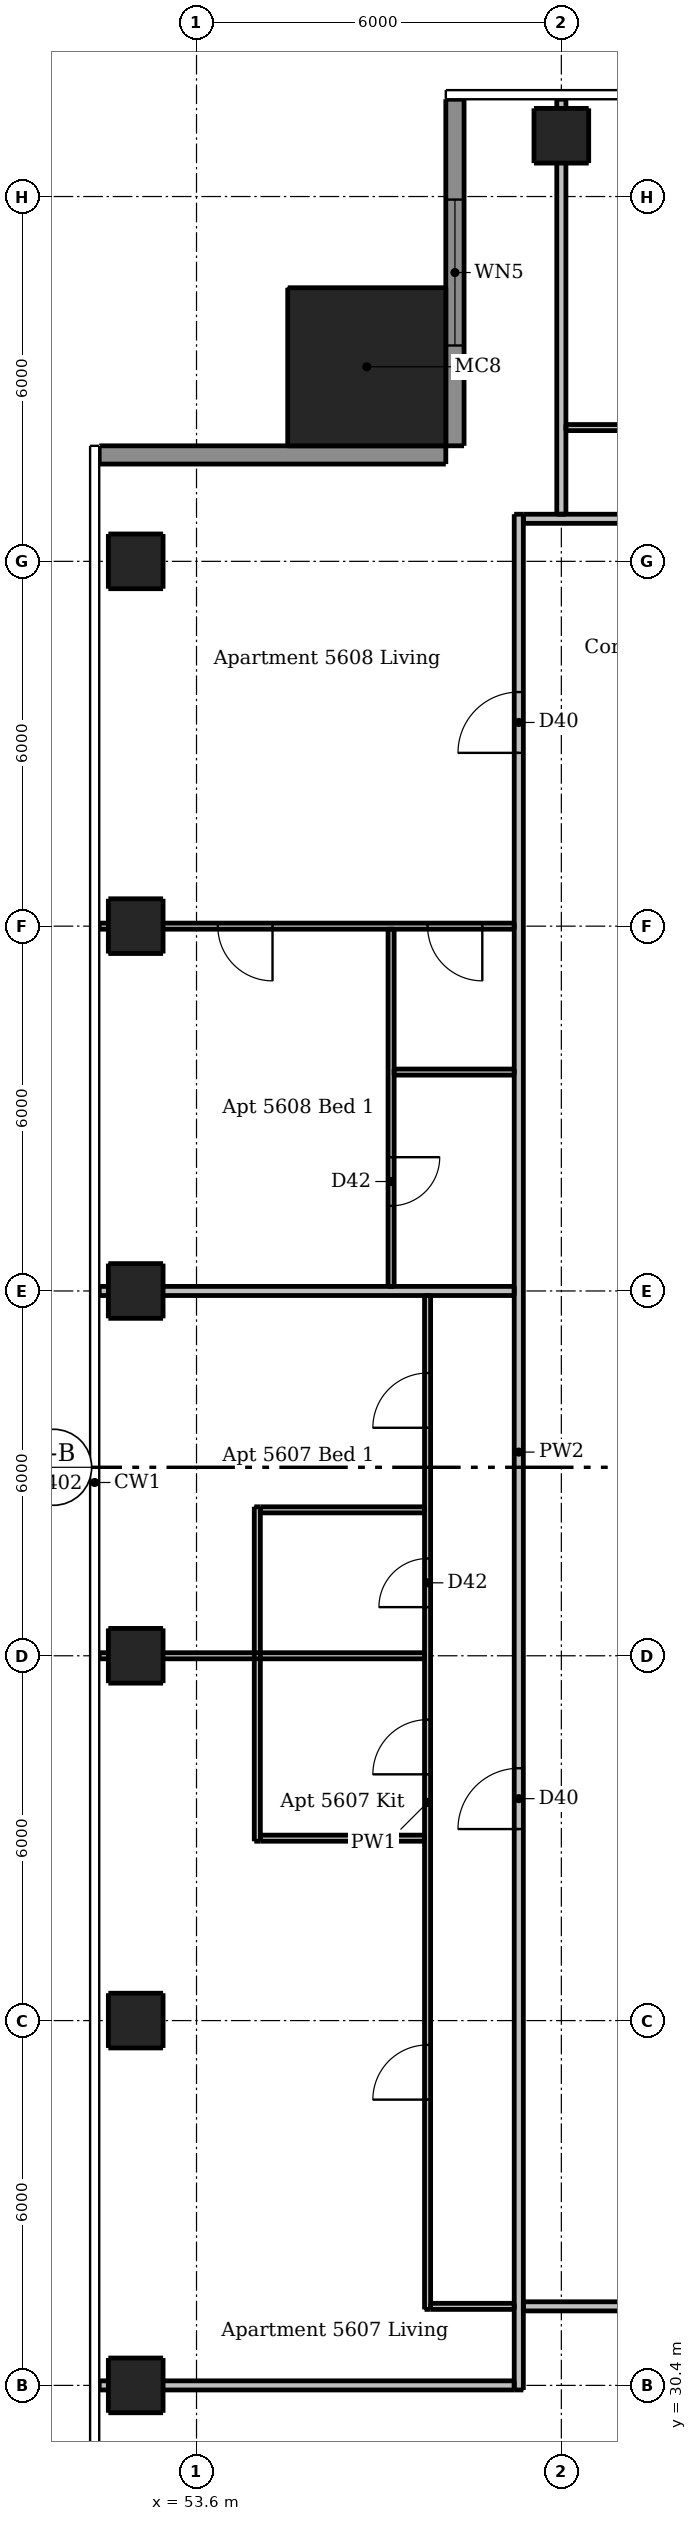
"""IFC4 building model, lengths in metres.
Left out: names, types, materials, properties, quantities, classifications, styles, units other than length and angle.
Written with IfcOpenShell. Run it as: python <this file> out.ifc"""

import sys

from ifc_helpers import new_model, si_unit, direction, frame, frame_2d, origin, origin_2d, place, context, subcontext, project, spatial, rectangle, extrude, element, fill, save


model = new_model("IFC4")
c1 = context("Model", 3, precision=1e-05, world=origin(), true_north=direction((0.0, 1.0)))
c2 = subcontext(c1, "Body", "Model", "MODEL_VIEW")
j1 = project(units=[si_unit("LENGTHUNIT", "METRE"), si_unit("PLANEANGLEUNIT", "RADIAN")], contexts=[c1])
p1 = place(None, origin())
s1 = spatial("IfcSite", under=j1, at=p1, CompositionType="ELEMENT")
p2 = place(p1, origin())
s2 = spatial("IfcBuilding", under=s1, at=p2, CompositionType="ELEMENT")
p3 = place(p2, frame((0.0, 0.0, 210.1)))
s3 = spatial("IfcBuildingStorey", under=s2, at=p3, CompositionType="ELEMENT", Elevation=210.1)
for number, where, z_axis, x_axis in (
    (1, (59.6, 67.4, 0.0), (0.0, 0.0, 1.0), (1.0, 0.0, 0.0)),
    (2, (52.6, 30.4, 0.0), (0.0, 0.0, 1.0), (1.0, 0.0, 0.0)),
    (3, (52.6, 36.4, 0.0), (0.0, 0.0, 1.0), (1.0, 0.0, 0.0)),
    (4, (52.6, 42.4, 0.0), (0.0, 0.0, 1.0), (1.0, 0.0, 0.0)),
    (5, (52.6, 48.4, 0.0), (0.0, 0.0, 1.0), (1.0, 0.0, 0.0)),
    (6, (52.6, 54.4, 0.0), (0.0, 0.0, 1.0), (1.0, 0.0, 0.0)),
    (7, (52.6, 60.4, 0.0), (0.0, 0.0, 1.0), (1.0, 0.0, 0.0)),
):
    element("IfcColumn", number, at=place(p3, frame(where, z_axis=z_axis, x_axis=x_axis)), inside=s3, PredefinedType="COLUMN", context=c2, shape_type="SweptSolid", body=[
        extrude(rectangle(XDim=0.9, YDim=0.9, at=origin_2d()), origin(), (0.0, 0.0, 1.0), 3.05),
    ])
p4 = place(p3, frame((56.4, 63.6, 0.0), z_axis=(0.0, 0.0, 1.0), x_axis=(1.0, 0.0, 0.0)))
e8 = element("IfcColumn", 8, at=p4, inside=s3, PredefinedType="COLUMN", context=c2, shape_type="SweptSolid", body=[
    extrude(rectangle(XDim=2.6, YDim=2.6, at=origin_2d()), origin(), (0.0, 0.0, 1.0), 3.3),
])
p5 = place(p3, frame((57.85, 68.0, 0.0), z_axis=(0.0, 0.0, 1.0), x_axis=(0.0, -1.0, 0.0)))
e9 = element("IfcWall", 9, at=p5, inside=s3, PredefinedType="SOLIDWALL", context=c2, shape_type="SweptSolid", body=[
    extrude(rectangle(XDim=5.7, YDim=0.3, at=frame_2d((2.85, 0.0))), origin(), (0.0, 0.0, 1.0), 3.05),
])
p6 = place(p5, frame((1.65, 0.0, 0.15)))
e10 = element("IfcOpeningElement", 10, at=p6, cuts=e9, PredefinedType="OPENING", context=c2, shape_type="SweptSolid", body=[
    extrude(rectangle(XDim=2.4, YDim=2.1, at=frame_2d((1.2, 1.05))), frame((0.0, 0.16, 0.0), z_axis=(0.0, -1.0, 0.0), x_axis=(1.0, 0.0, 0.0)), (0.0, 0.0, 1.0), 0.32),
])
p7 = place(p3, frame((57.7, 62.15, 0.0), z_axis=(0.0, 0.0, 1.0), x_axis=(-1.0, 0.0, 0.0)))
e11 = element("IfcWall", 11, at=p7, inside=s3, PredefinedType="SOLIDWALL", context=c2, shape_type="SweptSolid", body=[
    extrude(rectangle(XDim=5.7, YDim=0.3, at=frame_2d((2.85, 0.0))), origin(), (0.0, 0.0, 1.0), 3.05),
])
p8 = place(p3, frame((54.6, 39.35, 0.0), z_axis=(0.0, 0.0, 1.0), x_axis=(0.0, 1.0, 0.0)))
e12 = element("IfcWall", 12, at=p8, inside=s3, PredefinedType="PARTITIONING", context=c2, shape_type="SweptSolid", body=[
    extrude(rectangle(XDim=5.5, YDim=0.1, at=frame_2d((2.75, 0.0))), origin(), (0.0, 0.0, 1.0), 3.05),
])
p9 = place(p3, frame((56.8, 54.35, 0.0), z_axis=(0.0, 0.0, 1.0), x_axis=(0.0, -1.0, 0.0)))
e13 = element("IfcWall", 13, at=p9, inside=s3, PredefinedType="PARTITIONING", context=c2, shape_type="SweptSolid", body=[
    extrude(rectangle(XDim=5.875, YDim=0.1, at=frame_2d((2.938, 0.0))), origin(), (0.0, 0.0, 1.0), 3.05),
])
p10 = place(p9, frame((3.75, 0.0, 0.0)))
e14 = element("IfcOpeningElement", 14, at=p10, cuts=e13, PredefinedType="OPENING", context=c2, shape_type="SweptSolid", body=[
    extrude(rectangle(XDim=0.8, YDim=2.1, at=frame_2d((0.4, 1.05))), frame((0.0, 0.06, 0.0), z_axis=(0.0, -1.0, 0.0), x_axis=(1.0, 0.0, 0.0)), (0.0, 0.0, 1.0), 0.12),
])
p11 = place(p3, frame((57.4, 31.65, 0.0), z_axis=(0.0, 0.0, 1.0), x_axis=(0.0, 1.0, 0.0)))
e15 = element("IfcWall", 15, at=p11, inside=s3, PredefinedType="PARTITIONING", context=c2, shape_type="SweptSolid", body=[
    extrude(rectangle(XDim=16.675, YDim=0.1, at=frame_2d((8.337, 0.0))), origin(), (0.0, 0.0, 1.0), 3.05),
])
p12 = place(p11, frame((3.45, 0.0, 0.0)))
e16 = element("IfcOpeningElement", 16, at=p12, cuts=e15, PredefinedType="OPENING", context=c2, shape_type="SweptSolid", body=[
    extrude(rectangle(XDim=0.9, YDim=2.1, at=frame_2d((0.45, 1.05))), frame((0.0, 0.06, 0.0), z_axis=(0.0, -1.0, 0.0), x_axis=(1.0, 0.0, 0.0)), (0.0, 0.0, 1.0), 0.12),
])
p13 = place(p11, frame((8.8, 0.0, 0.0)))
e17 = element("IfcOpeningElement", 17, at=p13, cuts=e15, PredefinedType="OPENING", context=c2, shape_type="SweptSolid", body=[
    extrude(rectangle(XDim=0.9, YDim=2.1, at=frame_2d((0.45, 1.05))), frame((0.0, 0.06, 0.0), z_axis=(0.0, -1.0, 0.0), x_axis=(1.0, 0.0, 0.0)), (0.0, 0.0, 1.0), 0.12),
])
p14 = place(p11, frame((14.5, 0.0, 0.0)))
e18 = element("IfcOpeningElement", 18, at=p14, cuts=e15, PredefinedType="OPENING", context=c2, shape_type="SweptSolid", body=[
    extrude(rectangle(XDim=0.9, YDim=2.1, at=frame_2d((0.45, 1.05))), frame((0.0, 0.06, 0.0), z_axis=(0.0, -1.0, 0.0), x_axis=(1.0, 0.0, 0.0)), (0.0, 0.0, 1.0), 0.12),
])
p15 = place(p11, frame((11.55, 0.0, 0.0)))
e19 = element("IfcOpeningElement", 19, at=p15, cuts=e15, PredefinedType="OPENING", context=c2, shape_type="SweptSolid", body=[
    extrude(rectangle(XDim=0.8, YDim=2.1, at=frame_2d((0.4, 1.05))), frame((0.0, 0.06, 0.0), z_axis=(0.0, -1.0, 0.0), x_axis=(1.0, 0.0, 0.0)), (0.0, 0.0, 1.0), 0.12),
])
p16 = place(p3, frame((59.675, 62.6, 0.0), z_axis=(0.0, 0.0, 1.0), x_axis=(1.0, 0.0, 0.0)))
e20 = element("IfcWall", 20, at=p16, inside=s3, PredefinedType="PARTITIONING", context=c2, shape_type="SweptSolid", body=[
    extrude(rectangle(XDim=17.85, YDim=0.1, at=frame_2d((8.925, 0.0))), origin(), (0.0, 0.0, 1.0), 3.05),
])
p17 = place(p16, frame((3.975, 0.0, 0.0)))
e21 = element("IfcOpeningElement", 21, at=p17, cuts=e20, PredefinedType="OPENING", context=c2, shape_type="SweptSolid", body=[
    extrude(rectangle(XDim=0.9, YDim=2.1, at=frame_2d((0.45, 1.05))), frame((0.0, 0.06, 0.0), z_axis=(0.0, -1.0, 0.0), x_axis=(1.0, 0.0, 0.0)), (0.0, 0.0, 1.0), 0.12),
])
p18 = place(p16, frame((9.975, 0.0, 0.0)))
e22 = element("IfcOpeningElement", 22, at=p18, cuts=e20, PredefinedType="OPENING", context=c2, shape_type="SweptSolid", body=[
    extrude(rectangle(XDim=0.9, YDim=2.1, at=frame_2d((0.45, 1.05))), frame((0.0, 0.06, 0.0), z_axis=(0.0, -1.0, 0.0), x_axis=(1.0, 0.0, 0.0)), (0.0, 0.0, 1.0), 0.12),
])
p19 = place(p16, frame((15.675, 0.0, 0.0)))
e23 = element("IfcOpeningElement", 23, at=p19, cuts=e20, PredefinedType="OPENING", context=c2, shape_type="SweptSolid", body=[
    extrude(rectangle(XDim=0.9, YDim=2.1, at=frame_2d((0.45, 1.05))), frame((0.0, 0.06, 0.0), z_axis=(0.0, -1.0, 0.0), x_axis=(1.0, 0.0, 0.0)), (0.0, 0.0, 1.0), 0.12),
])
p20 = place(p16, frame((12.725, 0.0, 0.0)))
e24 = element("IfcOpeningElement", 24, at=p20, cuts=e20, PredefinedType="OPENING", context=c2, shape_type="SweptSolid", body=[
    extrude(rectangle(XDim=0.8, YDim=2.1, at=frame_2d((0.4, 1.05))), frame((0.0, 0.06, 0.0), z_axis=(0.0, -1.0, 0.0), x_axis=(1.0, 0.0, 0.0)), (0.0, 0.0, 1.0), 0.12),
])
p21 = place(p3, frame((58.825, 54.4, 0.0), z_axis=(0.0, 0.0, 1.0), x_axis=(-1.0, 0.0, 0.0)))
e25 = element("IfcWall", 25, at=p21, inside=s3, PredefinedType="PARTITIONING", context=c2, shape_type="SweptSolid", body=[
    extrude(rectangle(XDim=6.825, YDim=0.1, at=frame_2d((3.413, 0.0))), origin(), (0.0, 0.0, 1.0), 2.516),
])
p22 = place(p21, frame((0.525, 0.0, 0.0)))
e26 = element("IfcOpeningElement", 26, at=p22, cuts=e25, PredefinedType="OPENING", context=c2, shape_type="SweptSolid", body=[
    extrude(rectangle(XDim=0.9, YDim=2.1, at=frame_2d((0.45, 1.05))), frame((0.0, 0.06, 0.0), z_axis=(0.0, -1.0, 0.0), x_axis=(1.0, 0.0, 0.0)), (0.0, 0.0, 1.0), 0.12),
])
p23 = place(p21, frame((3.975, 0.0, 0.0)))
e27 = element("IfcOpeningElement", 27, at=p23, cuts=e25, PredefinedType="OPENING", context=c2, shape_type="SweptSolid", body=[
    extrude(rectangle(XDim=0.9, YDim=2.1, at=frame_2d((0.45, 1.05))), frame((0.0, 0.06, 0.0), z_axis=(0.0, -1.0, 0.0), x_axis=(1.0, 0.0, 0.0)), (0.0, 0.0, 1.0), 0.12),
])
p24 = place(p3, frame((56.85, 52.0, 0.0), z_axis=(0.0, 0.0, 1.0), x_axis=(1.0, 0.0, 0.0)))
e28 = element("IfcWall", 28, at=p24, inside=s3, PredefinedType="PARTITIONING", context=c2, shape_type="SweptSolid", body=[
    extrude(rectangle(XDim=1.975, YDim=0.1, at=frame_2d((0.987, 0.0))), origin(), (0.0, 0.0, 1.0), 3.05),
])
p25 = place(p3, frame((54.65, 44.8, 0.0), z_axis=(0.0, 0.0, 1.0), x_axis=(1.0, 0.0, 0.0)))
e29 = element("IfcWall", 29, at=p25, inside=s3, PredefinedType="PARTITIONING", context=c2, shape_type="SweptSolid", body=[
    extrude(rectangle(XDim=2.7, YDim=0.1, at=frame_2d((1.35, 0.0))), origin(), (0.0, 0.0, 1.0), 3.05),
])
p26 = place(p3, frame((52.0, 42.4, 0.0), z_axis=(0.0, 0.0, 1.0), x_axis=(1.0, 0.0, 0.0)))
e30 = element("IfcWall", 30, at=p26, inside=s3, PredefinedType="PARTITIONING", context=c2, shape_type="SweptSolid", body=[
    extrude(rectangle(XDim=5.35, YDim=0.1, at=frame_2d((2.675, 0.0))), origin(), (0.0, 0.0, 1.0), 2.516),
])
p27 = place(p3, frame((54.65, 39.4, 0.0), z_axis=(0.0, 0.0, 1.0), x_axis=(1.0, 0.0, 0.0)))
e31 = element("IfcWall", 31, at=p27, inside=s3, PredefinedType="PARTITIONING", context=c2, shape_type="SweptSolid", body=[
    extrude(rectangle(XDim=2.7, YDim=0.1, at=frame_2d((1.35, 0.0))), origin(), (0.0, 0.0, 1.0), 3.05),
])
p28 = place(p3, frame((57.45, 31.7, 0.0), z_axis=(0.0, 0.0, 1.0), x_axis=(1.0, 0.0, 0.0)))
e32 = element("IfcWall", 32, at=p28, inside=s3, PredefinedType="PARTITIONING", context=c2, shape_type="SweptSolid", body=[
    extrude(rectangle(XDim=1.375, YDim=0.1, at=frame_2d((0.688, 0.0))), origin(), (0.0, 0.0, 1.0), 3.05),
])
p29 = place(p3, frame((58.9, 30.325, 0.0), z_axis=(0.0, 0.0, 1.0), x_axis=(0.0, 1.0, 0.0)))
e33 = element("IfcWall", 33, at=p29, inside=s3, PredefinedType="PARTITIONING", context=c2, shape_type="SweptSolid", body=[
    extrude(rectangle(XDim=30.85, YDim=0.15, at=frame_2d((15.425, 0.0))), origin(), (0.0, 0.0, 1.0), 3.05),
])
p30 = place(p29, frame((9.225, 0.0, 0.0)))
e34 = element("IfcOpeningElement", 34, at=p30, cuts=e33, PredefinedType="OPENING", context=c2, shape_type="SweptSolid", body=[
    extrude(rectangle(XDim=1.0, YDim=2.1, at=frame_2d((0.5, 1.05))), frame((0.0, 0.085, 0.0), z_axis=(0.0, -1.0, 0.0), x_axis=(1.0, 0.0, 0.0)), (0.0, 0.0, 1.0), 0.17),
])
p31 = place(p29, frame((26.925, 0.0, 0.0)))
e35 = element("IfcOpeningElement", 35, at=p31, cuts=e33, PredefinedType="OPENING", context=c2, shape_type="SweptSolid", body=[
    extrude(rectangle(XDim=1.0, YDim=2.1, at=frame_2d((0.5, 1.05))), frame((0.0, 0.085, 0.0), z_axis=(0.0, -1.0, 0.0), x_axis=(1.0, 0.0, 0.0)), (0.0, 0.0, 1.0), 0.17),
])
p32 = place(p3, frame((59.6, 61.175, 0.0), z_axis=(0.0, 0.0, 1.0), x_axis=(0.0, 1.0, 0.0)))
e36 = element("IfcWall", 36, at=p32, inside=s3, PredefinedType="PARTITIONING", context=c2, shape_type="SweptSolid", body=[
    extrude(rectangle(XDim=6.825, YDim=0.15, at=frame_2d((3.413, 0.0))), origin(), (0.0, 0.0, 1.0), 2.51),
])
p33 = place(p3, frame((58.975, 61.1, 0.0), z_axis=(0.0, 0.0, 1.0), x_axis=(1.0, 0.0, 0.0)))
e37 = element("IfcWall", 37, at=p33, inside=s3, PredefinedType="PARTITIONING", context=c2, shape_type="SweptSolid", body=[
    extrude(rectangle(XDim=29.25, YDim=0.15, at=frame_2d((14.625, 0.0))), origin(), (0.0, 0.0, 1.0), 3.05),
])
p34 = place(p33, frame((9.125, 0.0, 0.0)))
e38 = element("IfcOpeningElement", 38, at=p34, cuts=e37, PredefinedType="OPENING", context=c2, shape_type="SweptSolid", body=[
    extrude(rectangle(XDim=1.0, YDim=2.1, at=frame_2d((0.5, 1.05))), frame((0.0, 0.085, 0.0), z_axis=(0.0, -1.0, 0.0), x_axis=(1.0, 0.0, 0.0)), (0.0, 0.0, 1.0), 0.17),
])
p35 = place(p33, frame((26.475, 0.0, 0.0)))
e39 = element("IfcOpeningElement", 39, at=p35, cuts=e37, PredefinedType="OPENING", context=c2, shape_type="SweptSolid", body=[
    extrude(rectangle(XDim=1.0, YDim=2.1, at=frame_2d((0.5, 1.05))), frame((0.0, 0.085, 0.0), z_axis=(0.0, -1.0, 0.0), x_axis=(1.0, 0.0, 0.0)), (0.0, 0.0, 1.0), 0.17),
])
p36 = place(p3, frame((52.0, 48.4, 0.0), z_axis=(0.0, 0.0, 1.0), x_axis=(1.0, 0.0, 0.0)))
e40 = element("IfcWall", 40, at=p36, inside=s3, PredefinedType="PARTITIONING", context=c2, shape_type="SweptSolid", body=[
    extrude(rectangle(XDim=6.825, YDim=0.15, at=frame_2d((3.413, 0.0))), origin(), (0.0, 0.0, 1.0), 2.516),
])
p37 = place(p3, frame((89.525, 31.7, 0.0), z_axis=(0.0, 0.0, 1.0), x_axis=(-1.0, 0.0, 0.0)))
e41 = element("IfcWall", 41, at=p37, inside=s3, PredefinedType="PARTITIONING", context=c2, shape_type="SweptSolid", body=[
    extrude(rectangle(XDim=30.55, YDim=0.15, at=frame_2d((15.275, 0.0))), origin(), (0.0, 0.0, 1.0), 3.05),
])
p38 = place(p37, frame((26.775, 0.0, 0.0)))
e42 = element("IfcOpeningElement", 42, at=p38, cuts=e41, PredefinedType="OPENING", context=c2, shape_type="SweptSolid", body=[
    extrude(rectangle(XDim=1.0, YDim=2.1, at=frame_2d((0.5, 1.05))), frame((0.0, 0.085, 0.0), z_axis=(0.0, -1.0, 0.0), x_axis=(1.0, 0.0, 0.0)), (0.0, 0.0, 1.0), 0.17),
])
p39 = place(p37, frame((9.075, 0.0, 0.0)))
e43 = element("IfcOpeningElement", 43, at=p39, cuts=e41, PredefinedType="OPENING", context=c2, shape_type="SweptSolid", body=[
    extrude(rectangle(XDim=1.0, YDim=2.1, at=frame_2d((0.5, 1.05))), frame((0.0, 0.085, 0.0), z_axis=(0.0, -1.0, 0.0), x_axis=(1.0, 0.0, 0.0)), (0.0, 0.0, 1.0), 0.17),
])
p40 = place(p3, frame((52.0, 30.4, 0.0), z_axis=(0.0, 0.0, 1.0), x_axis=(1.0, 0.0, 0.0)))
e44 = element("IfcWall", 44, at=p40, inside=s3, PredefinedType="PARTITIONING", context=c2, shape_type="SweptSolid", body=[
    extrude(rectangle(XDim=6.825, YDim=0.15, at=frame_2d((3.413, 0.0))), origin(), (0.0, 0.0, 1.0), 2.647),
])
p41 = place(p6, origin())
e45 = element("IfcWindow", 45, at=p41, inside=s3, PartitioningType="DOUBLE_PANEL_VERTICAL", PredefinedType="WINDOW", context=c2, shape_type="SweptSolid", body=[
    extrude(rectangle(XDim=2.4, YDim=2.1, at=frame_2d((1.2, 1.05))), frame((0.0, 0.03, 0.0), z_axis=(0.0, -1.0, 0.0), x_axis=(1.0, 0.0, 0.0)), (0.0, 0.0, 1.0), 0.06),
])
fill(e10, e45)
p42 = place(p30, origin())
e46 = element("IfcDoor", 46, at=p42, inside=s3, OperationType="SINGLE_SWING_LEFT", PredefinedType="DOOR", context=c2, shape_type="SweptSolid", body=[
    extrude(rectangle(XDim=1.0, YDim=2.1, at=frame_2d((0.5, 1.05))), frame((0.0, 0.025, 0.0), z_axis=(0.0, -1.0, 0.0), x_axis=(1.0, 0.0, 0.0)), (0.0, 0.0, 1.0), 0.05),
])
fill(e34, e46)
p43 = place(p12, origin())
e47 = element("IfcDoor", 47, at=p43, inside=s3, OperationType="SINGLE_SWING_LEFT", PredefinedType="DOOR", context=c2, shape_type="SweptSolid", body=[
    extrude(rectangle(XDim=0.9, YDim=2.1, at=frame_2d((0.45, 1.05))), frame((0.0, 0.025, 0.0), z_axis=(0.0, -1.0, 0.0), x_axis=(1.0, 0.0, 0.0)), (0.0, 0.0, 1.0), 0.05),
])
fill(e16, e47)
p44 = place(p13, origin())
e48 = element("IfcDoor", 48, at=p44, inside=s3, OperationType="SINGLE_SWING_LEFT", PredefinedType="DOOR", context=c2, shape_type="SweptSolid", body=[
    extrude(rectangle(XDim=0.9, YDim=2.1, at=frame_2d((0.45, 1.05))), frame((0.0, 0.025, 0.0), z_axis=(0.0, -1.0, 0.0), x_axis=(1.0, 0.0, 0.0)), (0.0, 0.0, 1.0), 0.05),
])
fill(e17, e48)
p45 = place(p14, origin())
e49 = element("IfcDoor", 49, at=p45, inside=s3, OperationType="SINGLE_SWING_LEFT", PredefinedType="DOOR", context=c2, shape_type="SweptSolid", body=[
    extrude(rectangle(XDim=0.9, YDim=2.1, at=frame_2d((0.45, 1.05))), frame((0.0, 0.025, 0.0), z_axis=(0.0, -1.0, 0.0), x_axis=(1.0, 0.0, 0.0)), (0.0, 0.0, 1.0), 0.05),
])
fill(e18, e49)
p46 = place(p15, origin())
e50 = element("IfcDoor", 50, at=p46, inside=s3, OperationType="SINGLE_SWING_LEFT", PredefinedType="DOOR", context=c2, shape_type="SweptSolid", body=[
    extrude(rectangle(XDim=0.8, YDim=2.1, at=frame_2d((0.4, 1.05))), frame((0.0, 0.025, 0.0), z_axis=(0.0, -1.0, 0.0), x_axis=(1.0, 0.0, 0.0)), (0.0, 0.0, 1.0), 0.05),
])
fill(e19, e50)
p47 = place(p31, origin())
e51 = element("IfcDoor", 51, at=p47, inside=s3, OperationType="SINGLE_SWING_LEFT", PredefinedType="DOOR", context=c2, shape_type="SweptSolid", body=[
    extrude(rectangle(XDim=1.0, YDim=2.1, at=frame_2d((0.5, 1.05))), frame((0.0, 0.025, 0.0), z_axis=(0.0, -1.0, 0.0), x_axis=(1.0, 0.0, 0.0)), (0.0, 0.0, 1.0), 0.05),
])
fill(e35, e51)
p48 = place(p22, origin())
e52 = element("IfcDoor", 52, at=p48, inside=s3, OperationType="SINGLE_SWING_LEFT", PredefinedType="DOOR", context=c2, shape_type="SweptSolid", body=[
    extrude(rectangle(XDim=0.9, YDim=2.1, at=frame_2d((0.45, 1.05))), frame((0.0, 0.025, 0.0), z_axis=(0.0, -1.0, 0.0), x_axis=(1.0, 0.0, 0.0)), (0.0, 0.0, 1.0), 0.05),
])
fill(e26, e52)
p49 = place(p23, origin())
e53 = element("IfcDoor", 53, at=p49, inside=s3, OperationType="SINGLE_SWING_LEFT", PredefinedType="DOOR", context=c2, shape_type="SweptSolid", body=[
    extrude(rectangle(XDim=0.9, YDim=2.1, at=frame_2d((0.45, 1.05))), frame((0.0, 0.025, 0.0), z_axis=(0.0, -1.0, 0.0), x_axis=(1.0, 0.0, 0.0)), (0.0, 0.0, 1.0), 0.05),
])
fill(e27, e53)
p50 = place(p10, origin())
e54 = element("IfcDoor", 54, at=p50, inside=s3, OperationType="SINGLE_SWING_LEFT", PredefinedType="DOOR", context=c2, shape_type="SweptSolid", body=[
    extrude(rectangle(XDim=0.8, YDim=2.1, at=frame_2d((0.4, 1.05))), frame((0.0, 0.025, 0.0), z_axis=(0.0, -1.0, 0.0), x_axis=(1.0, 0.0, 0.0)), (0.0, 0.0, 1.0), 0.05),
])
fill(e14, e54)
save(model, sys.argv[1])
